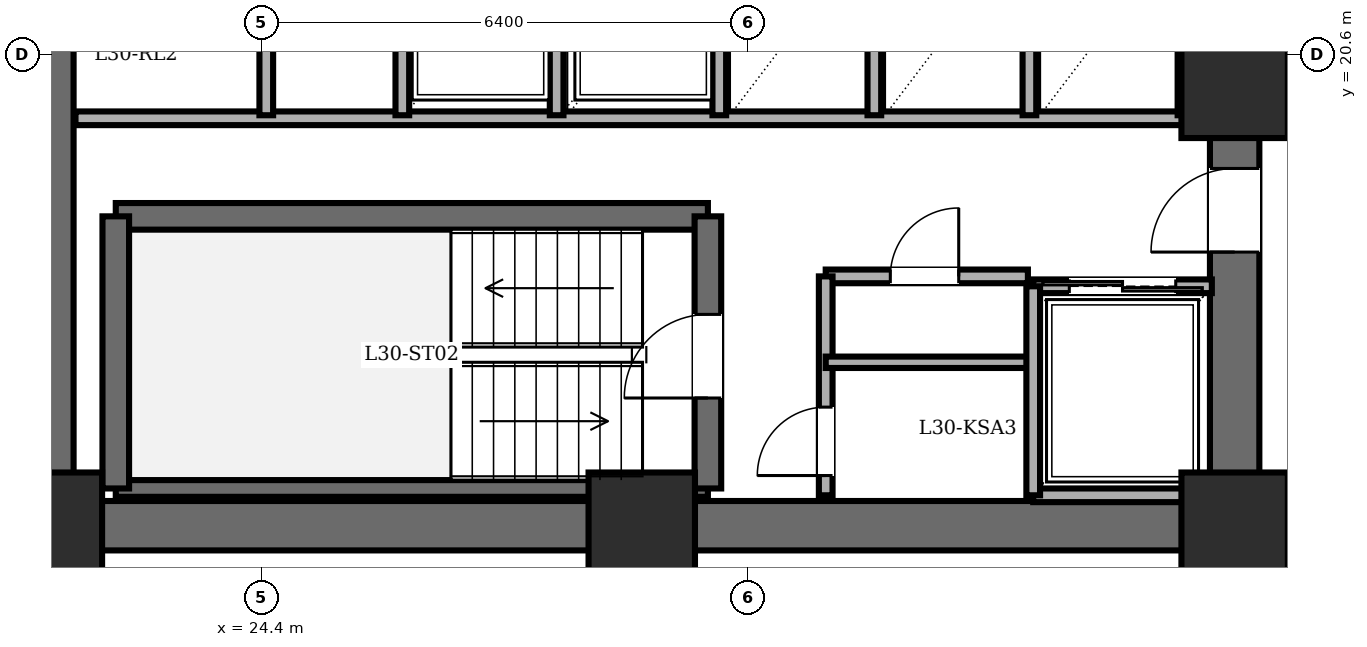
"""IFC4 building model, lengths in metres.
Left out: names, types, materials, properties, quantities, classifications, styles, units other than length and angle.
Written with IfcOpenShell. Run it as: python <this file> out.ifc"""

import sys

from ifc_helpers import new_model, si_unit, direction, frame, frame_2d, origin, origin_2d, place, context, subcontext, project, spatial, rectangle, extrude, element, fill, save


model = new_model("IFC4")
c1 = context("Model", 3, precision=1e-05, world=origin(), true_north=direction((0.0, 1.0)))
c2 = subcontext(c1, "Body", "Model", "MODEL_VIEW")
j1 = project(units=[si_unit("LENGTHUNIT", "METRE"), si_unit("PLANEANGLEUNIT", "RADIAN")], contexts=[c1])
p1 = place(None, origin())
s1 = spatial("IfcSite", under=j1, at=p1, CompositionType="ELEMENT")
p2 = place(p1, origin())
s2 = spatial("IfcBuilding", under=s1, at=p2, CompositionType="ELEMENT")
p3 = place(p2, frame((0.0, 0.0, 115.1)))
s3 = spatial("IfcBuildingStorey", under=s2, at=p3, CompositionType="ELEMENT", Elevation=115.1)
for number, where, z_axis, x_axis in (
    (1, (21.6, 14.4, 0.0), (0.0, 0.0, 1.0), (1.0, 0.0, 0.0)),
    (2, (29.4, 14.4, 0.0), (0.0, 0.0, 1.0), (1.0, 0.0, 0.0)),
    (3, (37.2, 14.4, 0.0), (0.0, 0.0, 1.0), (1.0, 0.0, 0.0)),
    (4, (37.2, 20.2, 0.0), (0.0, 0.0, 1.0), (1.0, 0.0, 0.0)),
):
    element("IfcColumn", number, at=place(p3, frame(where, z_axis=z_axis, x_axis=x_axis)), inside=s3, PredefinedType="COLUMN", context=c2, shape_type="SweptSolid", body=[
        extrude(rectangle(XDim=1.4, YDim=1.4, at=origin_2d()), origin(), (0.0, 0.0, 1.0), 3.6),
    ])
p4 = place(p3, frame((21.6, 14.4, 0.0), z_axis=(0.0, 0.0, 1.0), x_axis=(0.0, 1.0, 0.0)))
e5 = element("IfcWall", 5, at=p4, inside=s3, PredefinedType="SHEAR", context=c2, shape_type="SweptSolid", body=[
    extrude(rectangle(XDim=19.2, YDim=0.65, at=frame_2d((9.6, 0.0))), origin(), (0.0, 0.0, 1.0), 3.4),
])
p5 = place(p3, frame((37.2, 14.4, 0.0), z_axis=(0.0, 0.0, 1.0), x_axis=(-1.0, 0.0, 0.0)))
e6 = element("IfcWall", 6, at=p5, inside=s3, PredefinedType="SHEAR", context=c2, shape_type="SweptSolid", body=[
    extrude(rectangle(XDim=15.6, YDim=0.65, at=frame_2d((7.8, 0.0))), origin(), (0.0, 0.0, 1.0), 3.4),
])
p6 = place(p3, frame((37.2, 14.4, 0.0), z_axis=(0.0, 0.0, 1.0), x_axis=(0.0, 1.0, 0.0)))
e7 = element("IfcWall", 7, at=p6, inside=s3, PredefinedType="SHEAR", context=c2, shape_type="SweptSolid", body=[
    extrude(rectangle(XDim=19.2, YDim=0.65, at=frame_2d((9.6, 0.0))), origin(), (0.0, 0.0, 1.0), 3.4),
])
p7 = place(p6, frame((15.8, 0.0, 0.0)))
e8 = element("IfcOpeningElement", 8, at=p7, cuts=e7, PredefinedType="OPENING", context=c2, shape_type="SweptSolid", body=[
    extrude(rectangle(XDim=1.15, YDim=2.15, at=frame_2d((0.575, 1.075))), frame((0.0, 0.335, 0.0), z_axis=(0.0, -1.0, 0.0), x_axis=(1.0, 0.0, 0.0)), (0.0, 0.0, 1.0), 0.67),
])
p8 = place(p6, frame((3.6, 0.0, 0.0)))
e9 = element("IfcOpeningElement", 9, at=p8, cuts=e7, PredefinedType="OPENING", context=c2, shape_type="SweptSolid", body=[
    extrude(rectangle(XDim=1.1, YDim=2.15, at=frame_2d((0.55, 1.075))), frame((0.0, 0.335, 0.0), z_axis=(0.0, -1.0, 0.0), x_axis=(1.0, 0.0, 0.0)), (0.0, 0.0, 1.0), 0.67),
])
p9 = place(p6, frame((8.6, 0.0, 0.0)))
e10 = element("IfcOpeningElement", 10, at=p9, cuts=e7, PredefinedType="OPENING", context=c2, shape_type="SweptSolid", body=[
    extrude(rectangle(XDim=1.3, YDim=2.2, at=frame_2d((0.65, 1.1))), frame((0.0, 0.335, 0.0), z_axis=(0.0, -1.0, 0.0), x_axis=(1.0, 0.0, 0.0)), (0.0, 0.0, 1.0), 0.67),
])
p10 = place(p3, frame((22.48, 18.47, 0.0), z_axis=(0.0, 0.0, 1.0), x_axis=(1.0, 0.0, 0.0)))
e11 = element("IfcWall", 11, at=p10, inside=s3, PredefinedType="SOLIDWALL", context=c2, shape_type="SweptSolid", body=[
    extrude(rectangle(XDim=7.79, YDim=0.35, at=frame_2d((3.895, 0.0))), origin(), (0.0, 0.0, 1.0), 3.4),
])
p11 = place(p3, frame((22.48, 14.89, 0.0), z_axis=(0.0, 0.0, 1.0), x_axis=(1.0, 0.0, 0.0)))
e12 = element("IfcWall", 12, at=p11, inside=s3, PredefinedType="PARTITIONING", context=c2, shape_type="SweptSolid", body=[
    extrude(rectangle(XDim=7.79, YDim=0.22, at=frame_2d((3.895, 0.0))), origin(), (0.0, 0.0, 1.0), 3.4),
])
p12 = place(p3, frame((22.48, 14.89, 0.0), z_axis=(0.0, 0.0, 1.0), x_axis=(0.0, 1.0, 0.0)))
e13 = element("IfcWall", 13, at=p12, inside=s3, PredefinedType="SOLIDWALL", context=c2, shape_type="SweptSolid", body=[
    extrude(rectangle(XDim=3.58, YDim=0.35, at=frame_2d((1.79, 0.0))), origin(), (0.0, 0.0, 1.0), 3.4),
])
p13 = place(p3, frame((30.27, 14.89, 0.0), z_axis=(0.0, 0.0, 1.0), x_axis=(0.0, 1.0, 0.0)))
e14 = element("IfcWall", 14, at=p13, inside=s3, PredefinedType="SOLIDWALL", context=c2, shape_type="SweptSolid", body=[
    extrude(rectangle(XDim=3.58, YDim=0.35, at=frame_2d((1.79, 0.0))), origin(), (0.0, 0.0, 1.0), 3.4),
])
p14 = place(p13, frame((1.19, 0.0, 0.0)))
e15 = element("IfcOpeningElement", 15, at=p14, cuts=e14, PredefinedType="OPENING", context=c2, shape_type="SweptSolid", body=[
    extrude(rectangle(XDim=1.1, YDim=2.15, at=frame_2d((0.55, 1.075))), frame((0.0, 0.185, 0.0), z_axis=(0.0, -1.0, 0.0), x_axis=(1.0, 0.0, 0.0)), (0.0, 0.0, 1.0), 0.37),
])
p15 = place(p3, frame((21.95, 19.76, 0.0), z_axis=(0.0, 0.0, 1.0), x_axis=(1.0, 0.0, 0.0)))
e16 = element("IfcWall", 16, at=p15, inside=s3, PredefinedType="PARTITIONING", context=c2, shape_type="SweptSolid", body=[
    extrude(rectangle(XDim=14.87, YDim=0.18, at=frame_2d((7.435, 0.0))), origin(), (0.0, 0.0, 1.0), 3.4),
])
p16 = place(p3, frame((31.82, 17.68, 0.0), z_axis=(0.0, 0.0, 1.0), x_axis=(1.0, 0.0, 0.0)))
e17 = element("IfcWall", 17, at=p16, inside=s3, PredefinedType="PARTITIONING", context=c2, shape_type="SweptSolid", body=[
    extrude(rectangle(XDim=2.66, YDim=0.18, at=frame_2d((1.33, 0.0))), origin(), (0.0, 0.0, 1.0), 3.4),
])
p17 = place(p16, frame((0.85, 0.0, 0.0)))
e18 = element("IfcOpeningElement", 18, at=p17, cuts=e17, PredefinedType="OPENING", context=c2, shape_type="SweptSolid", body=[
    extrude(rectangle(XDim=0.9, YDim=2.05, at=frame_2d((0.45, 1.025))), frame((0.0, 0.1, 0.0), z_axis=(0.0, -1.0, 0.0), x_axis=(1.0, 0.0, 0.0)), (0.0, 0.0, 1.0), 0.2),
])
p18 = place(p3, frame((31.82, 14.8, 0.0), z_axis=(0.0, 0.0, 1.0), x_axis=(0.0, 1.0, 0.0)))
e19 = element("IfcWall", 19, at=p18, inside=s3, PredefinedType="PARTITIONING", context=c2, shape_type="SweptSolid", body=[
    extrude(rectangle(XDim=2.88, YDim=0.18, at=frame_2d((1.44, 0.0))), origin(), (0.0, 0.0, 1.0), 3.4),
])
p19 = place(p18, frame((0.26, 0.0, 0.0)))
e20 = element("IfcOpeningElement", 20, at=p19, cuts=e19, PredefinedType="OPENING", context=c2, shape_type="SweptSolid", body=[
    extrude(rectangle(XDim=0.9, YDim=2.05, at=frame_2d((0.45, 1.025))), frame((0.0, 0.1, 0.0), z_axis=(0.0, -1.0, 0.0), x_axis=(1.0, 0.0, 0.0)), (0.0, 0.0, 1.0), 0.2),
])
p20 = place(p3, frame((31.82, 16.55, 0.0), z_axis=(0.0, 0.0, 1.0), x_axis=(1.0, 0.0, 0.0)))
e21 = element("IfcWall", 21, at=p20, inside=s3, PredefinedType="PARTITIONING", context=c2, shape_type="SweptSolid", body=[
    extrude(rectangle(XDim=2.66, YDim=0.15, at=frame_2d((1.33, 0.0))), origin(), (0.0, 0.0, 1.0), 3.4),
])
p21 = place(p3, frame((34.55, 17.55, 0.0), z_axis=(0.0, 0.0, 1.0), x_axis=(1.0, 0.0, 0.0)))
e22 = element("IfcWall", 22, at=p21, inside=s3, PredefinedType="PARTITIONING", context=c2, shape_type="SweptSolid", body=[
    extrude(rectangle(XDim=2.35, YDim=0.18, at=frame_2d((1.175, 0.0))), origin(), (0.0, 0.0, 1.0), 3.4),
])
p22 = place(p21, frame((0.475, 0.0, 0.0)))
e23 = element("IfcOpeningElement", 23, at=p22, cuts=e22, PredefinedType="OPENING", context=c2, shape_type="SweptSolid", body=[
    extrude(rectangle(XDim=1.4, YDim=2.3, at=frame_2d((0.7, 1.15))), frame((0.0, 0.1, 0.0), z_axis=(0.0, -1.0, 0.0), x_axis=(1.0, 0.0, 0.0)), (0.0, 0.0, 1.0), 0.2),
])
p23 = place(p3, frame((36.9, 14.8, 0.0), z_axis=(0.0, 0.0, 1.0), x_axis=(-1.0, 0.0, 0.0)))
e24 = element("IfcWall", 24, at=p23, inside=s3, PredefinedType="PARTITIONING", context=c2, shape_type="SweptSolid", body=[
    extrude(rectangle(XDim=2.35, YDim=0.18, at=frame_2d((1.175, 0.0))), origin(), (0.0, 0.0, 1.0), 3.4),
])
p24 = place(p3, frame((34.55, 17.55, 0.0), z_axis=(0.0, 0.0, 1.0), x_axis=(0.0, -1.0, 0.0)))
e25 = element("IfcWall", 25, at=p24, inside=s3, PredefinedType="PARTITIONING", context=c2, shape_type="SweptSolid", body=[
    extrude(rectangle(XDim=2.75, YDim=0.18, at=frame_2d((1.375, 0.0))), origin(), (0.0, 0.0, 1.0), 3.4),
])
for number, where, z_axis, x_axis in (
    (26, (28.28, 19.8, 0.0), (0.0, 0.0, 1.0), (0.0, 1.0, 0.0)),
    (27, (30.42, 19.8, 0.0), (0.0, 0.0, 1.0), (0.0, 1.0, 0.0)),
    (28, (32.46, 19.8, 0.0), (0.0, 0.0, 1.0), (0.0, 1.0, 0.0)),
    (29, (34.5, 19.8, 0.0), (0.0, 0.0, 1.0), (0.0, 1.0, 0.0)),
    (30, (36.54, 19.8, 0.0), (0.0, 0.0, 1.0), (0.0, 1.0, 0.0)),
):
    element("IfcWall", number, at=place(p3, frame(where, z_axis=z_axis, x_axis=x_axis)), inside=s3, PredefinedType="PARTITIONING", context=c2, shape_type="SweptSolid", body=[
        extrude(rectangle(XDim=2.5, YDim=0.18, at=frame_2d((1.25, 0.0))), origin(), (0.0, 0.0, 1.0), 3.4),
    ])
p25 = place(p3, frame((24.46, 19.8, 0.0), z_axis=(0.0, 0.0, 1.0), x_axis=(0.0, 1.0, 0.0)))
e31 = element("IfcWall", 31, at=p25, inside=s3, PredefinedType="PARTITIONING", context=c2, shape_type="SweptSolid", body=[
    extrude(rectangle(XDim=3.3, YDim=0.18, at=frame_2d((1.65, 0.0))), origin(), (0.0, 0.0, 1.0), 3.4),
])
p26 = place(p25, frame((1.19, 0.0, 0.0)))
e32 = element("IfcOpeningElement", 32, at=p26, cuts=e31, PredefinedType="OPENING", context=c2, shape_type="SweptSolid", body=[
    extrude(rectangle(XDim=0.92, YDim=2.1, at=frame_2d((0.46, 1.05))), frame((0.0, 0.1, 0.0), z_axis=(0.0, -1.0, 0.0), x_axis=(1.0, 0.0, 0.0)), (0.0, 0.0, 1.0), 0.2),
])
p27 = place(p3, frame((26.25, 19.8, 0.0), z_axis=(0.0, 0.0, 1.0), x_axis=(0.0, 1.0, 0.0)))
e33 = element("IfcWall", 33, at=p27, inside=s3, PredefinedType="PARTITIONING", context=c2, shape_type="SweptSolid", body=[
    extrude(rectangle(XDim=2.55, YDim=0.18, at=frame_2d((1.275, 0.0))), origin(), (0.0, 0.0, 1.0), 3.4),
])
p28 = place(p14, origin())
e34 = element("IfcDoor", 34, at=p28, inside=s3, OperationType="SINGLE_SWING_LEFT", PredefinedType="DOOR", context=c2, shape_type="SweptSolid", body=[
    extrude(rectangle(XDim=1.1, YDim=2.15, at=frame_2d((0.55, 1.075))), frame((0.0, 0.025, 0.0), z_axis=(0.0, -1.0, 0.0), x_axis=(1.0, 0.0, 0.0)), (0.0, 0.0, 1.0), 0.05),
])
fill(e15, e34)
p29 = place(p8, origin())
e35 = element("IfcDoor", 35, at=p29, inside=s3, OperationType="SINGLE_SWING_LEFT", PredefinedType="DOOR", context=c2, shape_type="SweptSolid", body=[
    extrude(rectangle(XDim=1.1, YDim=2.15, at=frame_2d((0.55, 1.075))), frame((0.0, 0.025, 0.0), z_axis=(0.0, -1.0, 0.0), x_axis=(1.0, 0.0, 0.0)), (0.0, 0.0, 1.0), 0.05),
])
fill(e9, e35)
p30 = place(p17, origin())
e36 = element("IfcDoor", 36, at=p30, inside=s3, OperationType="SINGLE_SWING_RIGHT", PredefinedType="DOOR", context=c2, shape_type="SweptSolid", body=[
    extrude(rectangle(XDim=0.9, YDim=2.05, at=frame_2d((0.45, 1.025))), frame((0.0, 0.025, 0.0), z_axis=(0.0, -1.0, 0.0), x_axis=(1.0, 0.0, 0.0)), (0.0, 0.0, 1.0), 0.05),
])
fill(e18, e36)
p31 = place(p19, origin())
e37 = element("IfcDoor", 37, at=p31, inside=s3, OperationType="SINGLE_SWING_LEFT", PredefinedType="DOOR", context=c2, shape_type="SweptSolid", body=[
    extrude(rectangle(XDim=0.9, YDim=2.05, at=frame_2d((0.45, 1.025))), frame((0.0, 0.025, 0.0), z_axis=(0.0, -1.0, 0.0), x_axis=(1.0, 0.0, 0.0)), (0.0, 0.0, 1.0), 0.05),
])
fill(e20, e37)
p32 = place(p22, origin())
e38 = element("IfcDoor", 38, at=p32, inside=s3, OperationType="DOUBLE_DOOR_SLIDING", PredefinedType="DOOR", context=c2, shape_type="SweptSolid", body=[
    extrude(rectangle(XDim=1.4, YDim=2.3, at=frame_2d((0.7, 1.15))), frame((0.0, 0.025, 0.0), z_axis=(0.0, -1.0, 0.0), x_axis=(1.0, 0.0, 0.0)), (0.0, 0.0, 1.0), 0.05),
])
fill(e23, e38)
save(model, sys.argv[1])
